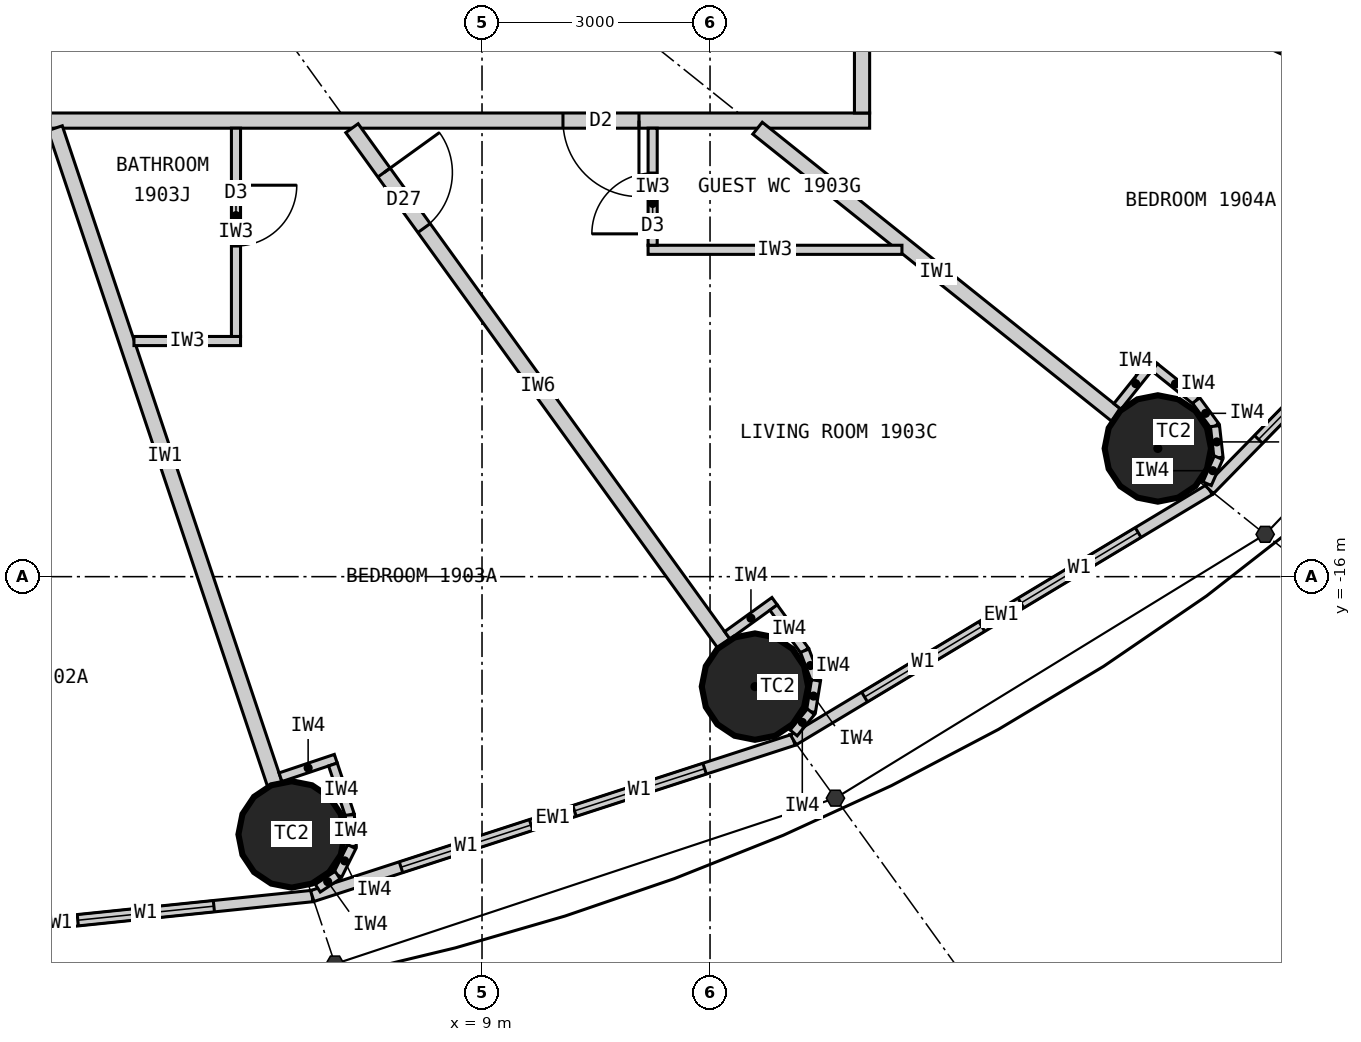
"""IFC4 building model, lengths in metres.
Left out: names, types, materials, properties, quantities, classifications, styles, units other than length and angle.
Written with IfcOpenShell. Run it as: python <this file> out.ifc"""

import sys

from ifc_helpers import new_model, si_unit, direction, frame, frame_2d, origin, origin_2d, place, context, subcontext, project, spatial, rectangle, circle, extrude, element, fill, save


model = new_model("IFC4")
c1 = context("Model", 3, precision=1e-05, world=origin(), true_north=direction((0.0, 1.0)))
c2 = subcontext(c1, "Body", "Model", "MODEL_VIEW")
j1 = project(units=[si_unit("LENGTHUNIT", "METRE"), si_unit("PLANEANGLEUNIT", "RADIAN")], contexts=[c1])
p1 = place(None, origin())
s1 = spatial("IfcSite", under=j1, at=p1, CompositionType="ELEMENT")
p2 = place(p1, origin())
s2 = spatial("IfcBuilding", under=s1, at=p2, CompositionType="ELEMENT")
p3 = place(p2, frame((0.0, 0.0, 77.1)))
s3 = spatial("IfcBuildingStorey", under=s2, at=p3, CompositionType="ELEMENT", Elevation=77.1)
for number, where, z_axis, x_axis in (
    (1, (6.495, -19.391, 0.0), (0.0, 0.0, 1.0), (1.0, 0.0, 0.0)),
    (2, (12.591, -17.447, 0.0), (0.0, 0.0, 1.0), (1.0, 0.0, 0.0)),
    (3, (17.892, -14.313, 0.0), (0.0, 0.0, 1.0), (1.0, 0.0, 0.0)),
):
    element("IfcColumn", number, at=place(p3, frame(where, z_axis=z_axis, x_axis=x_axis)), inside=s3, PredefinedType="COLUMN", context=c2, shape_type="SweptSolid", body=[
        extrude(circle(Radius=0.7, at=origin_2d()), origin(), (0.0, 0.0, 1.0), 3.3),
    ])
p4 = place(p3, frame((0.0, -20.9, 0.0), z_axis=(0.0, 0.0, 1.0), x_axis=(0.994721394369, 0.102612609291, 0.0)))
e4 = element("IfcWall", 4, at=p4, inside=s3, PredefinedType="ELEMENTEDWALL", context=c2, shape_type="SweptSolid", body=[
    extrude(rectangle(XDim=6.802, YDim=0.15, at=frame_2d((3.401, 0.0))), origin(), (0.0, 0.0, 1.0), 3.12),
])
p5 = place(p4, frame((1.301, 0.0, 0.9)))
e5 = element("IfcOpeningElement", 5, at=p5, cuts=e4, PredefinedType="OPENING", context=c2, shape_type="SweptSolid", body=[
    extrude(rectangle(XDim=1.8, YDim=1.9, at=frame_2d((0.9, 0.95))), frame((0.0, 0.085, 0.0), z_axis=(0.0, -1.0, 0.0), x_axis=(1.0, 0.0, 0.0)), (0.0, 0.0, 1.0), 0.17),
])
p6 = place(p4, frame((3.701, 0.0, 0.9)))
e6 = element("IfcOpeningElement", 6, at=p6, cuts=e4, PredefinedType="OPENING", context=c2, shape_type="SweptSolid", body=[
    extrude(rectangle(XDim=1.8, YDim=1.9, at=frame_2d((0.9, 0.95))), frame((0.0, 0.085, 0.0), z_axis=(0.0, -1.0, 0.0), x_axis=(1.0, 0.0, 0.0)), (0.0, 0.0, 1.0), 0.17),
])
p7 = place(p3, frame((6.766, -20.202, 0.0), z_axis=(0.0, 0.0, 1.0), x_axis=(0.951137534625, 0.308767534285, 0.0)))
e7 = element("IfcWall", 7, at=p7, inside=s3, PredefinedType="ELEMENTEDWALL", context=c2, shape_type="SweptSolid", body=[
    extrude(rectangle(XDim=6.655, YDim=0.15, at=frame_2d((3.328, 0.0))), origin(), (0.0, 0.0, 1.0), 3.12),
])
p8 = place(p7, frame((1.228, 0.0, 0.9)))
e8 = element("IfcOpeningElement", 8, at=p8, cuts=e7, PredefinedType="OPENING", context=c2, shape_type="SweptSolid", body=[
    extrude(rectangle(XDim=1.8, YDim=1.9, at=frame_2d((0.9, 0.95))), frame((0.0, 0.085, 0.0), z_axis=(0.0, -1.0, 0.0), x_axis=(1.0, 0.0, 0.0)), (0.0, 0.0, 1.0), 0.17),
])
p9 = place(p7, frame((3.628, 0.0, 0.9)))
e9 = element("IfcOpeningElement", 9, at=p9, cuts=e7, PredefinedType="OPENING", context=c2, shape_type="SweptSolid", body=[
    extrude(rectangle(XDim=1.8, YDim=1.9, at=frame_2d((0.9, 0.95))), frame((0.0, 0.085, 0.0), z_axis=(0.0, -1.0, 0.0), x_axis=(1.0, 0.0, 0.0)), (0.0, 0.0, 1.0), 0.17),
])
p10 = place(p3, frame((13.096, -18.147, 0.0), z_axis=(0.0, 0.0, 1.0), x_axis=(0.856983180864, 0.515344377787, 0.0)))
e10 = element("IfcWall", 10, at=p10, inside=s3, PredefinedType="ELEMENTEDWALL", context=c2, shape_type="SweptSolid", body=[
    extrude(rectangle(XDim=6.386, YDim=0.15, at=frame_2d((3.193, 0.0))), origin(), (0.0, 0.0, 1.0), 3.12),
])
p11 = place(p10, frame((1.093, 0.0, 0.9)))
e11 = element("IfcOpeningElement", 11, at=p11, cuts=e10, PredefinedType="OPENING", context=c2, shape_type="SweptSolid", body=[
    extrude(rectangle(XDim=1.8, YDim=1.9, at=frame_2d((0.9, 0.95))), frame((0.0, 0.085, 0.0), z_axis=(0.0, -1.0, 0.0), x_axis=(1.0, 0.0, 0.0)), (0.0, 0.0, 1.0), 0.17),
])
p12 = place(p10, frame((3.493, 0.0, 0.9)))
e12 = element("IfcOpeningElement", 12, at=p12, cuts=e10, PredefinedType="OPENING", context=c2, shape_type="SweptSolid", body=[
    extrude(rectangle(XDim=1.8, YDim=1.9, at=frame_2d((0.9, 0.95))), frame((0.0, 0.085, 0.0), z_axis=(0.0, -1.0, 0.0), x_axis=(1.0, 0.0, 0.0)), (0.0, 0.0, 1.0), 0.17),
])
p13 = place(p3, frame((18.57, -14.856, 0.0), z_axis=(0.0, 0.0, 1.0), x_axis=(0.699602905915, 0.714531856557, 0.0)))
e13 = element("IfcWall", 13, at=p13, inside=s3, PredefinedType="ELEMENTEDWALL", context=c2, shape_type="SweptSolid", body=[
    extrude(rectangle(XDim=6.051, YDim=0.15, at=frame_2d((3.025, 0.0))), origin(), (0.0, 0.0, 1.0), 3.12),
])
p14 = place(p13, frame((0.926, 0.0, 0.9)))
e14 = element("IfcOpeningElement", 14, at=p14, cuts=e13, PredefinedType="OPENING", context=c2, shape_type="SweptSolid", body=[
    extrude(rectangle(XDim=1.8, YDim=1.9, at=frame_2d((0.9, 0.95))), frame((0.0, 0.085, 0.0), z_axis=(0.0, -1.0, 0.0), x_axis=(1.0, 0.0, 0.0)), (0.0, 0.0, 1.0), 0.17),
])
p15 = place(p13, frame((3.325, 0.0, 0.9)))
e15 = element("IfcOpeningElement", 15, at=p15, cuts=e13, PredefinedType="OPENING", context=c2, shape_type="SweptSolid", body=[
    extrude(rectangle(XDim=1.8, YDim=1.9, at=frame_2d((0.9, 0.95))), frame((0.0, 0.085, 0.0), z_axis=(0.0, -1.0, 0.0), x_axis=(1.0, 0.0, 0.0)), (0.0, 0.0, 1.0), 0.17),
])
p16 = place(p3, frame((14.1, -10.0, 0.0), z_axis=(0.0, 0.0, 1.0), x_axis=(-1.0, 0.0, 0.0)))
e16 = element("IfcWall", 16, at=p16, inside=s3, PredefinedType="PARTITIONING", context=c2, shape_type="SweptSolid", body=[
    extrude(rectangle(XDim=28.2, YDim=0.2, at=frame_2d((14.1, 0.0))), origin(), (0.0, 0.0, 1.0), 3.12),
])
p17 = place(p16, frame((24.165, 0.0, 0.0)))
e17 = element("IfcOpeningElement", 17, at=p17, cuts=e16, PredefinedType="OPENING", context=c2, shape_type="SweptSolid", body=[
    extrude(rectangle(XDim=1.0, YDim=2.2, at=frame_2d((0.5, 1.1))), frame((0.0, 0.11, 0.0), z_axis=(0.0, -1.0, 0.0), x_axis=(1.0, 0.0, 0.0)), (0.0, 0.0, 1.0), 0.22),
])
p18 = place(p16, frame((14.923, 0.0, 0.0)))
e18 = element("IfcOpeningElement", 18, at=p18, cuts=e16, PredefinedType="OPENING", context=c2, shape_type="SweptSolid", body=[
    extrude(rectangle(XDim=1.0, YDim=2.2, at=frame_2d((0.5, 1.1))), frame((0.0, 0.11, 0.0), z_axis=(0.0, -1.0, 0.0), x_axis=(1.0, 0.0, 0.0)), (0.0, 0.0, 1.0), 0.22),
])
p19 = place(p16, frame((3.035, 0.0, 0.0)))
e19 = element("IfcOpeningElement", 19, at=p19, cuts=e16, PredefinedType="OPENING", context=c2, shape_type="SweptSolid", body=[
    extrude(rectangle(XDim=1.0, YDim=2.2, at=frame_2d((0.5, 1.1))), frame((0.0, 0.11, 0.0), z_axis=(0.0, -1.0, 0.0), x_axis=(1.0, 0.0, 0.0)), (0.0, 0.0, 1.0), 0.22),
])
p20 = place(p3, frame((3.383, -10.1, 0.0), z_axis=(0.0, 0.0, 1.0), x_axis=(0.31759592231, -0.948226149256, 0.0)))
e20 = element("IfcWall", 20, at=p20, inside=s3, PredefinedType="PARTITIONING", context=c2, shape_type="SweptSolid", body=[
    extrude(rectangle(XDim=9.098, YDim=0.2, at=frame_2d((4.549, 0.0))), origin(), (0.0, 0.0, 1.0), 2.32),
])
p21 = place(p3, frame((7.289, -10.1, 0.0), z_axis=(0.0, 0.0, 1.0), x_axis=(0.585198353053, -0.810890182197, 0.0)))
e21 = element("IfcWall", 21, at=p21, inside=s3, PredefinedType="PARTITIONING", context=c2, shape_type="SweptSolid", body=[
    extrude(rectangle(XDim=8.36, YDim=0.2, at=frame_2d((4.18, 0.0))), origin(), (0.0, 0.0, 1.0), 2.32),
])
p22 = place(p21, frame((0.72, 0.0, 0.0)))
e22 = element("IfcOpeningElement", 22, at=p22, cuts=e21, PredefinedType="OPENING", context=c2, shape_type="SweptSolid", body=[
    extrude(rectangle(XDim=0.9, YDim=2.1, at=frame_2d((0.45, 1.05))), frame((0.0, 0.11, 0.0), z_axis=(0.0, -1.0, 0.0), x_axis=(1.0, 0.0, 0.0)), (0.0, 0.0, 1.0), 0.22),
])
p23 = place(p3, frame((12.625, -10.1, 0.0), z_axis=(0.0, 0.0, 1.0), x_axis=(0.780892451574, -0.624665493744, 0.0)))
e23 = element("IfcWall", 23, at=p23, inside=s3, PredefinedType="PARTITIONING", context=c2, shape_type="SweptSolid", body=[
    extrude(rectangle(XDim=6.045, YDim=0.2, at=frame_2d((3.022, 0.0))), origin(), (0.0, 0.0, 1.0), 2.32),
])
p24 = place(p3, frame((14.1, -6.512, 0.0), z_axis=(0.0, 0.0, 1.0), x_axis=(0.907832871056, -0.419332181247, 0.0)))
e24 = element("IfcWall", 24, at=p24, inside=s3, PredefinedType="PARTITIONING", context=c2, shape_type="SweptSolid", body=[
    extrude(rectangle(XDim=8.023, YDim=0.2, at=frame_2d((4.011, 0.0))), origin(), (0.0, 0.0, 1.0), 2.32),
])
p25 = place(p24, frame((4.17, 0.0, 0.0)))
e25 = element("IfcOpeningElement", 25, at=p25, cuts=e24, PredefinedType="OPENING", context=c2, shape_type="SweptSolid", body=[
    extrude(rectangle(XDim=0.9, YDim=2.1, at=frame_2d((0.45, 1.05))), frame((0.0, 0.11, 0.0), z_axis=(0.0, -1.0, 0.0), x_axis=(1.0, 0.0, 0.0)), (0.0, 0.0, 1.0), 0.22),
])
p26 = place(p3, frame((4.421, -12.9, 0.0), z_axis=(0.0, 0.0, 1.0), x_axis=(1.0, 0.0, 0.0)))
e26 = element("IfcWall", 26, at=p26, inside=s3, PredefinedType="PARTITIONING", context=c2, shape_type="SweptSolid", body=[
    extrude(rectangle(XDim=1.402, YDim=0.12, at=frame_2d((0.701, 0.0))), origin(), (0.0, 0.0, 1.0), 3.12),
])
p27 = place(p3, frame((5.763, -10.1, 0.0), z_axis=(0.0, 0.0, 1.0), x_axis=(0.0, -1.0, 0.0)))
e27 = element("IfcWall", 27, at=p27, inside=s3, PredefinedType="PARTITIONING", context=c2, shape_type="SweptSolid", body=[
    extrude(rectangle(XDim=2.74, YDim=0.12, at=frame_2d((1.37, 0.0))), origin(), (0.0, 0.0, 1.0), 3.12),
])
p28 = place(p27, frame((0.75, 0.0, 0.0)))
e28 = element("IfcOpeningElement", 28, at=p28, cuts=e27, PredefinedType="OPENING", context=c2, shape_type="SweptSolid", body=[
    extrude(rectangle(XDim=0.8, YDim=2.1, at=frame_2d((0.4, 1.05))), frame((0.0, 0.07, 0.0), z_axis=(0.0, -1.0, 0.0), x_axis=(1.0, 0.0, 0.0)), (0.0, 0.0, 1.0), 0.14),
])
p29 = place(p3, frame((14.525, -11.7, 0.0), z_axis=(0.0, 0.0, 1.0), x_axis=(-1.0, 0.0, 0.0)))
e29 = element("IfcWall", 29, at=p29, inside=s3, PredefinedType="PARTITIONING", context=c2, shape_type="SweptSolid", body=[
    extrude(rectangle(XDim=3.34, YDim=0.12, at=frame_2d((1.67, 0.0))), origin(), (0.0, 0.0, 1.0), 3.12),
])
p30 = place(p3, frame((11.245, -10.1, 0.0), z_axis=(0.0, 0.0, 1.0), x_axis=(0.0, -1.0, 0.0)))
e30 = element("IfcWall", 30, at=p30, inside=s3, PredefinedType="PARTITIONING", context=c2, shape_type="SweptSolid", body=[
    extrude(rectangle(XDim=1.54, YDim=0.12, at=frame_2d((0.77, 0.0))), origin(), (0.0, 0.0, 1.0), 3.12),
])
p31 = place(p30, frame((0.59, 0.0, 0.0)))
e31 = element("IfcOpeningElement", 31, at=p31, cuts=e30, PredefinedType="OPENING", context=c2, shape_type="SweptSolid", body=[
    extrude(rectangle(XDim=0.8, YDim=2.1, at=frame_2d((0.4, 1.05))), frame((0.0, 0.07, 0.0), z_axis=(0.0, -1.0, 0.0), x_axis=(1.0, 0.0, 0.0)), (0.0, 0.0, 1.0), 0.14),
])
p32 = place(p3, frame((14.0, -9.9, 0.0), z_axis=(0.0, 0.0, 1.0), x_axis=(0.0, 1.0, 0.0)))
e32 = element("IfcWall", 32, at=p32, inside=s3, PredefinedType="PARTITIONING", context=c2, shape_type="SweptSolid", body=[
    extrude(rectangle(XDim=13.232, YDim=0.2, at=frame_2d((6.616, 0.0))), origin(), (0.0, 0.0, 1.0), 3.12),
])
p33 = place(p32, frame((4.948, 0.0, 0.0)))
e33 = element("IfcOpeningElement", 33, at=p33, cuts=e32, PredefinedType="OPENING", context=c2, shape_type="SweptSolid", body=[
    extrude(rectangle(XDim=1.0, YDim=2.2, at=frame_2d((0.5, 1.1))), frame((0.0, 0.11, 0.0), z_axis=(0.0, -1.0, 0.0), x_axis=(1.0, 0.0, 0.0)), (0.0, 0.0, 1.0), 0.22),
])
p34 = place(p32, frame((8.718, 0.0, 0.0)))
e34 = element("IfcOpeningElement", 34, at=p34, cuts=e32, PredefinedType="OPENING", context=c2, shape_type="SweptSolid", body=[
    extrude(rectangle(XDim=1.0, YDim=2.2, at=frame_2d((0.5, 1.1))), frame((0.0, 0.11, 0.0), z_axis=(0.0, -1.0, 0.0), x_axis=(1.0, 0.0, 0.0)), (0.0, 0.0, 1.0), 0.22),
])
p35 = place(p32, frame((11.74, 0.0, 0.0)))
e35 = element("IfcOpeningElement", 35, at=p35, cuts=e32, PredefinedType="OPENING", context=c2, shape_type="SweptSolid", body=[
    extrude(rectangle(XDim=1.0, YDim=2.2, at=frame_2d((0.5, 1.1))), frame((0.0, 0.11, 0.0), z_axis=(0.0, -1.0, 0.0), x_axis=(1.0, 0.0, 0.0)), (0.0, 0.0, 1.0), 0.22),
])
p36 = place(p3, frame((6.348, -18.639, 0.0), z_axis=(0.0, 0.0, 1.0), x_axis=(0.948268951266, 0.317468102437, 0.0)))
e36 = element("IfcWall", 36, at=p36, inside=s3, PredefinedType="PARTITIONING", context=c2, shape_type="SweptSolid", body=[
    extrude(rectangle(XDim=0.768, YDim=0.12, at=frame_2d((0.384, 0.0))), origin(), (0.0, 0.0, 1.0), 3.12),
])
p37 = place(p3, frame((7.038, -18.471, 0.0), z_axis=(0.0, 0.0, 1.0), x_axis=(0.317378466199, -0.9482989556, 0.0)))
e37 = element("IfcWall", 37, at=p37, inside=s3, PredefinedType="PARTITIONING", context=c2, shape_type="SweptSolid", body=[
    extrude(rectangle(XDim=0.7, YDim=0.12, at=frame_2d((0.35, 0.0))), origin(), (0.0, 0.0, 1.0), 3.12),
])
p38 = place(p3, frame((7.26, -19.135, 0.0), z_axis=(0.0, 0.0, 1.0), x_axis=(0.0613238046, -0.99811792439, 0.0)))
e38 = element("IfcWall", 38, at=p38, inside=s3, PredefinedType="PARTITIONING", context=c2, shape_type="SweptSolid", body=[
    extrude(rectangle(XDim=0.418, YDim=0.12, at=frame_2d((0.209, 0.0))), origin(), (0.0, 0.0, 1.0), 3.12),
])
p39 = place(p3, frame((7.286, -19.552, 0.0), z_axis=(0.0, 0.0, 1.0), x_axis=(-0.445810757773, -0.89512723579, 0.0)))
e39 = element("IfcWall", 39, at=p39, inside=s3, PredefinedType="PARTITIONING", context=c2, shape_type="SweptSolid", body=[
    extrude(rectangle(XDim=0.418, YDim=0.12, at=frame_2d((0.209, 0.0))), origin(), (0.0, 0.0, 1.0), 3.12),
])
p40 = place(p3, frame((7.1, -19.926, 0.0), z_axis=(0.0, 0.0, 1.0), x_axis=(-0.833488262509, -0.552537162787, 0.0)))
e40 = element("IfcWall", 40, at=p40, inside=s3, PredefinedType="PARTITIONING", context=c2, shape_type="SweptSolid", body=[
    extrude(rectangle(XDim=0.313, YDim=0.12, at=frame_2d((0.156, 0.0))), origin(), (0.0, 0.0, 1.0), 3.12),
])
p41 = place(p3, frame((12.227, -16.772, 0.0), z_axis=(0.0, 0.0, 1.0), x_axis=(0.810821798253, 0.585293098778, 0.0)))
e41 = element("IfcWall", 41, at=p41, inside=s3, PredefinedType="PARTITIONING", context=c2, shape_type="SweptSolid", body=[
    extrude(rectangle(XDim=0.768, YDim=0.12, at=frame_2d((0.384, 0.0))), origin(), (0.0, 0.0, 1.0), 3.12),
])
p42 = place(p3, frame((12.836, -16.406, 0.0), z_axis=(0.0, 0.0, 1.0), x_axis=(0.585223113993, -0.810872312296, 0.0)))
e42 = element("IfcWall", 42, at=p42, inside=s3, PredefinedType="PARTITIONING", context=c2, shape_type="SweptSolid", body=[
    extrude(rectangle(XDim=0.7, YDim=0.12, at=frame_2d((0.35, 0.0))), origin(), (0.0, 0.0, 1.0), 3.12),
])
p43 = place(p3, frame((13.246, -16.974, 0.0), z_axis=(0.0, 0.0, 1.0), x_axis=(0.355728122235, -0.934589483705, 0.0)))
e43 = element("IfcWall", 43, at=p43, inside=s3, PredefinedType="PARTITIONING", context=c2, shape_type="SweptSolid", body=[
    extrude(rectangle(XDim=0.418, YDim=0.12, at=frame_2d((0.209, 0.0))), origin(), (0.0, 0.0, 1.0), 3.12),
])
p44 = place(p3, frame((13.394, -17.365, 0.0), z_axis=(0.0, 0.0, 1.0), x_axis=(-0.159379276926, -0.987217425943, 0.0)))
e44 = element("IfcWall", 44, at=p44, inside=s3, PredefinedType="PARTITIONING", context=c2, shape_type="SweptSolid", body=[
    extrude(rectangle(XDim=0.418, YDim=0.12, at=frame_2d((0.209, 0.0))), origin(), (0.0, 0.0, 1.0), 3.12),
])
p45 = place(p3, frame((13.328, -17.777, 0.0), z_axis=(0.0, 0.0, 1.0), x_axis=(-0.632276783541, -0.774742582407, 0.0)))
e45 = element("IfcWall", 45, at=p45, inside=s3, PredefinedType="PARTITIONING", context=c2, shape_type="SweptSolid", body=[
    extrude(rectangle(XDim=0.36, YDim=0.12, at=frame_2d((0.18, 0.0))), origin(), (0.0, 0.0, 1.0), 3.12),
])
p46 = place(p3, frame((17.361, -13.76, 0.0), z_axis=(0.0, 0.0, 1.0), x_axis=(0.624501042889, 0.781023973659, 0.0)))
e46 = element("IfcWall", 46, at=p46, inside=s3, PredefinedType="PARTITIONING", context=c2, shape_type="SweptSolid", body=[
    extrude(rectangle(XDim=0.767, YDim=0.12, at=frame_2d((0.384, 0.0))), origin(), (0.0, 0.0, 1.0), 3.12),
])
p47 = place(p3, frame((17.85, -13.246, 0.0), z_axis=(0.0, 0.0, 1.0), x_axis=(0.780902834923, -0.62465251333, 0.0)))
e47 = element("IfcWall", 47, at=p47, inside=s3, PredefinedType="PARTITIONING", context=c2, shape_type="SweptSolid", body=[
    extrude(rectangle(XDim=0.7, YDim=0.12, at=frame_2d((0.35, 0.0))), origin(), (0.0, 0.0, 1.0), 3.12),
])
for number, where, z_axis, x_axis in (
    (48, (18.396, -13.683, 0.0), (0.0, 0.0, 1.0), (0.592, -0.806, 0.0)),
    (49, (18.644, -14.02, 0.0), (0.0, 0.0, 1.0), (0.11, -0.994, 0.0)),
):
    element("IfcWall", number, at=place(p3, frame(where, z_axis=z_axis, x_axis=x_axis)), inside=s3, PredefinedType="PARTITIONING", context=c2, shape_type="SweptSolid", body=[
        extrude(rectangle(XDim=0.418, YDim=0.12, at=frame_2d((0.209, 0.0))), origin(), (0.0, 0.0, 1.0), 3.12),
    ])
p48 = place(p3, frame((18.69, -14.435, 0.0), z_axis=(0.0, 0.0, 1.0), x_axis=(-0.401093412634, -0.91603715773, 0.0)))
e50 = element("IfcWall", 50, at=p48, inside=s3, PredefinedType="PARTITIONING", context=c2, shape_type="SweptSolid", body=[
    extrude(rectangle(XDim=0.373, YDim=0.12, at=frame_2d((0.187, 0.0))), origin(), (0.0, 0.0, 1.0), 3.12),
])
p49 = place(p6, origin())
e51 = element("IfcWindow", 51, at=p49, inside=s3, PartitioningType="SINGLE_PANEL", PredefinedType="WINDOW", context=c2, shape_type="SweptSolid", body=[
    extrude(rectangle(XDim=1.8, YDim=1.9, at=frame_2d((0.9, 0.95))), frame((0.0, 0.03, 0.0), z_axis=(0.0, -1.0, 0.0), x_axis=(1.0, 0.0, 0.0)), (0.0, 0.0, 1.0), 0.06),
])
fill(e6, e51)
p50 = place(p8, origin())
e52 = element("IfcWindow", 52, at=p50, inside=s3, PartitioningType="SINGLE_PANEL", PredefinedType="WINDOW", context=c2, shape_type="SweptSolid", body=[
    extrude(rectangle(XDim=1.8, YDim=1.9, at=frame_2d((0.9, 0.95))), frame((0.0, 0.03, 0.0), z_axis=(0.0, -1.0, 0.0), x_axis=(1.0, 0.0, 0.0)), (0.0, 0.0, 1.0), 0.06),
])
fill(e8, e52)
p51 = place(p9, origin())
e53 = element("IfcWindow", 53, at=p51, inside=s3, PartitioningType="SINGLE_PANEL", PredefinedType="WINDOW", context=c2, shape_type="SweptSolid", body=[
    extrude(rectangle(XDim=1.8, YDim=1.9, at=frame_2d((0.9, 0.95))), frame((0.0, 0.03, 0.0), z_axis=(0.0, -1.0, 0.0), x_axis=(1.0, 0.0, 0.0)), (0.0, 0.0, 1.0), 0.06),
])
fill(e9, e53)
p52 = place(p11, origin())
e54 = element("IfcWindow", 54, at=p52, inside=s3, PartitioningType="SINGLE_PANEL", PredefinedType="WINDOW", context=c2, shape_type="SweptSolid", body=[
    extrude(rectangle(XDim=1.8, YDim=1.9, at=frame_2d((0.9, 0.95))), frame((0.0, 0.03, 0.0), z_axis=(0.0, -1.0, 0.0), x_axis=(1.0, 0.0, 0.0)), (0.0, 0.0, 1.0), 0.06),
])
fill(e11, e54)
p53 = place(p12, origin())
e55 = element("IfcWindow", 55, at=p53, inside=s3, PartitioningType="SINGLE_PANEL", PredefinedType="WINDOW", context=c2, shape_type="SweptSolid", body=[
    extrude(rectangle(XDim=1.8, YDim=1.9, at=frame_2d((0.9, 0.95))), frame((0.0, 0.03, 0.0), z_axis=(0.0, -1.0, 0.0), x_axis=(1.0, 0.0, 0.0)), (0.0, 0.0, 1.0), 0.06),
])
fill(e12, e55)
p54 = place(p14, origin())
e56 = element("IfcWindow", 56, at=p54, inside=s3, PartitioningType="SINGLE_PANEL", PredefinedType="WINDOW", context=c2, shape_type="SweptSolid", body=[
    extrude(rectangle(XDim=1.8, YDim=1.9, at=frame_2d((0.9, 0.95))), frame((0.0, 0.03, 0.0), z_axis=(0.0, -1.0, 0.0), x_axis=(1.0, 0.0, 0.0)), (0.0, 0.0, 1.0), 0.06),
])
fill(e14, e56)
p55 = place(p28, origin())
e57 = element("IfcDoor", 57, at=p55, inside=s3, OperationType="SINGLE_SWING_LEFT", PredefinedType="DOOR", context=c2, shape_type="SweptSolid", body=[
    extrude(rectangle(XDim=0.8, YDim=2.1, at=frame_2d((0.4, 1.05))), frame((0.0, 0.025, 0.0), z_axis=(0.0, -1.0, 0.0), x_axis=(1.0, 0.0, 0.0)), (0.0, 0.0, 1.0), 0.05),
])
fill(e28, e57)
p56 = place(p31, origin())
e58 = element("IfcDoor", 58, at=p56, inside=s3, OperationType="SINGLE_SWING_RIGHT", PredefinedType="DOOR", context=c2, shape_type="SweptSolid", body=[
    extrude(rectangle(XDim=0.8, YDim=2.1, at=frame_2d((0.4, 1.05))), frame((0.0, 0.025, 0.0), z_axis=(0.0, -1.0, 0.0), x_axis=(1.0, 0.0, 0.0)), (0.0, 0.0, 1.0), 0.05),
])
fill(e31, e58)
p57 = place(p19, origin())
e59 = element("IfcDoor", 59, at=p57, inside=s3, OperationType="SINGLE_SWING_LEFT", PredefinedType="DOOR", context=c2, shape_type="SweptSolid", body=[
    extrude(rectangle(XDim=1.0, YDim=2.2, at=frame_2d((0.5, 1.1))), frame((0.0, 0.025, 0.0), z_axis=(0.0, -1.0, 0.0), x_axis=(1.0, 0.0, 0.0)), (0.0, 0.0, 1.0), 0.05),
])
fill(e19, e59)
p58 = place(p22, origin())
e60 = element("IfcDoor", 60, at=p58, inside=s3, OperationType="SINGLE_SWING_LEFT", PredefinedType="DOOR", context=c2, shape_type="SweptSolid", body=[
    extrude(rectangle(XDim=0.9, YDim=2.1, at=frame_2d((0.45, 1.05))), frame((0.0, 0.025, 0.0), z_axis=(0.0, -1.0, 0.0), x_axis=(1.0, 0.0, 0.0)), (0.0, 0.0, 1.0), 0.05),
])
fill(e22, e60)
save(model, sys.argv[1])
